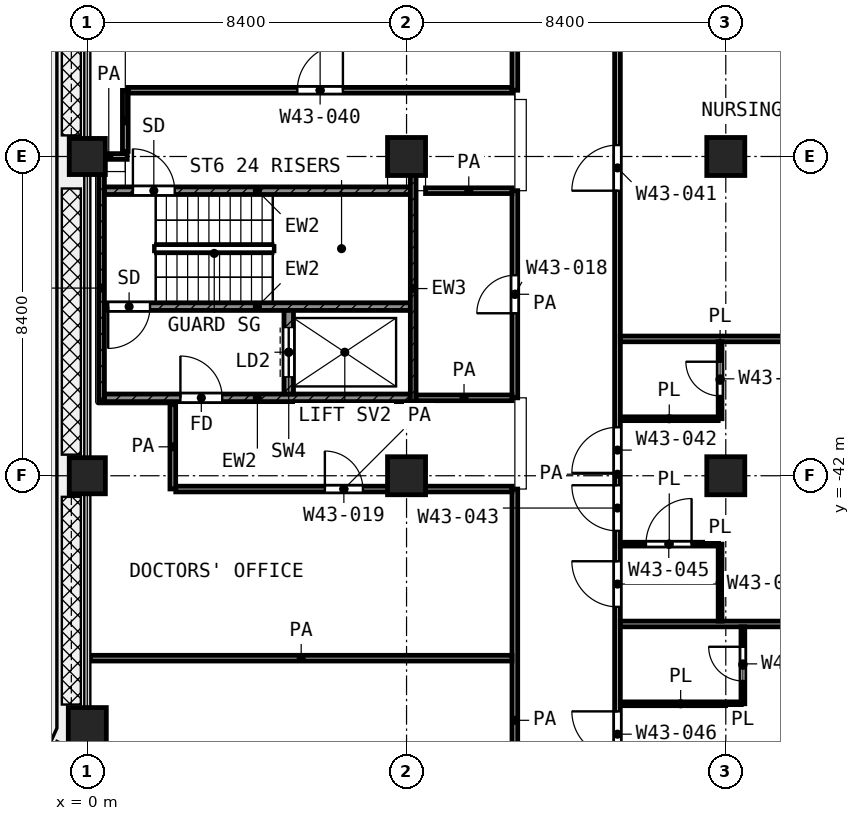
"""IFC4 building model, lengths in metres.
Left out: names, types, materials, properties, quantities, classifications, styles, units other than length and angle.
Written with IfcOpenShell. Run it as: python <this file> out.ifc"""

import sys

from ifc_helpers import new_model, si_unit, direction, frame, frame_2d, origin, origin_2d, place, context, subcontext, project, spatial, rectangle, extrude, element, fill, save


model = new_model("IFC4")
c1 = context("Model", 3, precision=1e-05, world=origin(), true_north=direction((0.0, 1.0)))
c2 = subcontext(c1, "Body", "Model", "MODEL_VIEW")
j1 = project(units=[si_unit("LENGTHUNIT", "METRE"), si_unit("PLANEANGLEUNIT", "RADIAN")], contexts=[c1])
p1 = place(None, origin())
s1 = spatial("IfcSite", under=j1, at=p1, CompositionType="ELEMENT")
p2 = place(p1, origin())
s2 = spatial("IfcBuilding", under=s1, at=p2, CompositionType="ELEMENT")
p3 = place(p2, frame((0.0, 0.0, 208.8)))
s3 = spatial("IfcBuildingStorey", under=s2, at=p3, CompositionType="ELEMENT", Elevation=208.8)
p4 = place(p3, frame((0.0, -33.6, 0.0), z_axis=(0.0, 0.0, 1.0), x_axis=(1.0, 0.0, 0.0)))
e1 = element("IfcColumn", 1, at=p4, inside=s3, PredefinedType="COLUMN", context=c2, shape_type="SweptSolid", body=[
    extrude(rectangle(XDim=0.95, YDim=0.95, at=origin_2d()), origin(), (0.0, 0.0, 1.0), 4.2),
])
for number, where, z_axis, x_axis in (
    (2, (8.4, -33.6, 0.0), (0.0, 0.0, 1.0), (1.0, 0.0, 0.0)),
    (3, (16.8, -33.6, 0.0), (0.0, 0.0, 1.0), (1.0, 0.0, 0.0)),
):
    element("IfcColumn", number, at=place(p3, frame(where, z_axis=z_axis, x_axis=x_axis)), inside=s3, PredefinedType="COLUMN", context=c2, shape_type="SweptSolid", body=[
        extrude(rectangle(XDim=1.0, YDim=1.0, at=origin_2d()), origin(), (0.0, 0.0, 1.0), 4.2),
    ])
p5 = place(p3, frame((0.0, -42.0, 0.0), z_axis=(0.0, 0.0, 1.0), x_axis=(1.0, 0.0, 0.0)))
e4 = element("IfcColumn", 4, at=p5, inside=s3, PredefinedType="COLUMN", context=c2, shape_type="SweptSolid", body=[
    extrude(rectangle(XDim=0.95, YDim=0.95, at=origin_2d()), origin(), (0.0, 0.0, 1.0), 4.2),
])
for number, where, z_axis, x_axis in (
    (5, (8.4, -42.0, 0.0), (0.0, 0.0, 1.0), (1.0, 0.0, 0.0)),
    (6, (16.8, -42.0, 0.0), (0.0, 0.0, 1.0), (1.0, 0.0, 0.0)),
    (7, (0.0, -48.6, 0.0), (0.0, 0.0, 1.0), (1.0, 0.0, 0.0)),
):
    element("IfcColumn", number, at=place(p3, frame(where, z_axis=z_axis, x_axis=x_axis)), inside=s3, PredefinedType="COLUMN", context=c2, shape_type="SweptSolid", body=[
        extrude(rectangle(XDim=1.0, YDim=1.0, at=origin_2d()), origin(), (0.0, 0.0, 1.0), 4.2),
    ])
p6 = place(p3, frame((0.375, -40.05, 0.0), z_axis=(0.0, 0.0, 1.0), x_axis=(0.0, 1.0, 0.0)))
e8 = element("IfcWall", 8, at=p6, inside=s3, PredefinedType="SHEAR", context=c2, shape_type="SweptSolid", body=[
    extrude(rectangle(XDim=5.975, YDim=0.15, at=frame_2d((2.988, 0.0))), origin(), (0.0, 0.0, 1.0), 3.7),
])
p7 = place(p3, frame((8.575, -40.05, 0.0), z_axis=(0.0, 0.0, 1.0), x_axis=(0.0, 1.0, 0.0)))
e9 = element("IfcWall", 9, at=p7, inside=s3, PredefinedType="SHEAR", context=c2, shape_type="SweptSolid", body=[
    extrude(rectangle(XDim=5.95, YDim=0.15, at=frame_2d((2.975, 0.0))), origin(), (0.0, 0.0, 1.0), 3.7),
])
p8 = place(p3, frame((0.45, -34.5, 0.0), z_axis=(0.0, 0.0, 1.0), x_axis=(1.0, 0.0, 0.0)))
e10 = element("IfcWall", 10, at=p8, inside=s3, PredefinedType="SHEAR", context=c2, shape_type="SweptSolid", body=[
    extrude(rectangle(XDim=8.05, YDim=0.2, at=frame_2d((4.025, 0.0))), origin(), (0.0, 0.0, 1.0), 3.7),
])
p9 = place(p8, frame((0.75, 0.0, 0.0)))
e11 = element("IfcOpeningElement", 11, at=p9, cuts=e10, PredefinedType="OPENING", context=c2, shape_type="SweptSolid", body=[
    extrude(rectangle(XDim=1.1, YDim=2.1, at=frame_2d((0.55, 1.05))), frame((0.0, 0.11, 0.0), z_axis=(0.0, -1.0, 0.0), x_axis=(1.0, 0.0, 0.0)), (0.0, 0.0, 1.0), 0.22),
])
p10 = place(p3, frame((0.45, -37.55, 0.0), z_axis=(0.0, 0.0, 1.0), x_axis=(1.0, 0.0, 0.0)))
e12 = element("IfcWall", 12, at=p10, inside=s3, PredefinedType="SHEAR", context=c2, shape_type="SweptSolid", body=[
    extrude(rectangle(XDim=8.05, YDim=0.2, at=frame_2d((4.025, 0.0))), origin(), (0.0, 0.0, 1.0), 3.7),
])
p11 = place(p10, frame((0.1, 0.0, 0.0)))
e13 = element("IfcOpeningElement", 13, at=p11, cuts=e12, PredefinedType="OPENING", context=c2, shape_type="SweptSolid", body=[
    extrude(rectangle(XDim=1.1, YDim=2.1, at=frame_2d((0.55, 1.05))), frame((0.0, 0.11, 0.0), z_axis=(0.0, -1.0, 0.0), x_axis=(1.0, 0.0, 0.0)), (0.0, 0.0, 1.0), 0.22),
])
p12 = place(p3, frame((0.45, -39.95, 0.0), z_axis=(0.0, 0.0, 1.0), x_axis=(1.0, 0.0, 0.0)))
e14 = element("IfcWall", 14, at=p12, inside=s3, PredefinedType="SHEAR", context=c2, shape_type="SweptSolid", body=[
    extrude(rectangle(XDim=8.05, YDim=0.2, at=frame_2d((4.025, 0.0))), origin(), (0.0, 0.0, 1.0), 3.7),
])
p13 = place(p12, frame((2.0, 0.0, 0.0)))
e15 = element("IfcOpeningElement", 15, at=p13, cuts=e14, PredefinedType="OPENING", context=c2, shape_type="SweptSolid", body=[
    extrude(rectangle(XDim=1.1, YDim=2.1, at=frame_2d((0.55, 1.05))), frame((0.0, 0.11, 0.0), z_axis=(0.0, -1.0, 0.0), x_axis=(1.0, 0.0, 0.0)), (0.0, 0.0, 1.0), 0.22),
])
p14 = place(p3, frame((5.3, -39.85, 0.0), z_axis=(0.0, 0.0, 1.0), x_axis=(0.0, 1.0, 0.0)))
e16 = element("IfcWall", 16, at=p14, inside=s3, PredefinedType="SHEAR", context=c2, shape_type="SweptSolid", body=[
    extrude(rectangle(XDim=2.2, YDim=0.25, at=frame_2d((1.1, 0.0))), origin(), (0.0, 0.0, 1.0), 3.7),
])
p15 = place(p14, frame((0.45, 0.0, 0.0)))
e17 = element("IfcOpeningElement", 17, at=p15, cuts=e16, PredefinedType="OPENING", context=c2, shape_type="SweptSolid", body=[
    extrude(rectangle(XDim=1.3, YDim=2.1, at=frame_2d((0.65, 1.05))), frame((0.0, 0.135, 0.0), z_axis=(0.0, -1.0, 0.0), x_axis=(1.0, 0.0, 0.0)), (0.0, 0.0, 1.0), 0.27),
])
p16 = place(p3, frame((14.025, -48.0, 0.0), z_axis=(0.0, 0.0, 1.0), x_axis=(1.0, 0.0, 0.0)))
e18 = element("IfcWall", 18, at=p16, inside=s3, PredefinedType="PARTITIONING", context=c2, shape_type="SweptSolid", body=[
    extrude(rectangle(XDim=3.175, YDim=0.1, at=frame_2d((1.587, 0.0))), origin(), (0.0, 0.0, 1.0), 3.7),
])
p17 = place(p3, frame((14.025, -43.8, 0.0), z_axis=(0.0, 0.0, 1.0), x_axis=(1.0, 0.0, 0.0)))
e19 = element("IfcWall", 19, at=p17, inside=s3, PredefinedType="PARTITIONING", context=c2, shape_type="SweptSolid", body=[
    extrude(rectangle(XDim=2.575, YDim=0.1, at=frame_2d((1.288, 0.0))), origin(), (0.0, 0.0, 1.0), 3.7),
])
p18 = place(p17, frame((0.675, 0.0, 0.0)))
e20 = element("IfcOpeningElement", 20, at=p18, cuts=e19, PredefinedType="OPENING", context=c2, shape_type="SweptSolid", body=[
    extrude(rectangle(XDim=1.2, YDim=2.1, at=frame_2d((0.6, 1.05))), frame((0.0, 0.06, 0.0), z_axis=(0.0, -1.0, 0.0), x_axis=(1.0, 0.0, 0.0)), (0.0, 0.0, 1.0), 0.12),
])
p19 = place(p3, frame((14.025, -40.5, 0.0), z_axis=(0.0, 0.0, 1.0), x_axis=(1.0, 0.0, 0.0)))
e21 = element("IfcWall", 21, at=p19, inside=s3, PredefinedType="PARTITIONING", context=c2, shape_type="SweptSolid", body=[
    extrude(rectangle(XDim=2.575, YDim=0.1, at=frame_2d((1.288, 0.0))), origin(), (0.0, 0.0, 1.0), 3.7),
])
p20 = place(p3, frame((16.65, -45.825, 0.0), z_axis=(0.0, 0.0, 1.0), x_axis=(0.0, 1.0, 0.0)))
e22 = element("IfcWall", 22, at=p20, inside=s3, PredefinedType="PARTITIONING", context=c2, shape_type="SweptSolid", body=[
    extrude(rectangle(XDim=2.025, YDim=0.1, at=frame_2d((1.012, 0.0))), origin(), (0.0, 0.0, 1.0), 3.7),
])
p21 = place(p3, frame((16.65, -40.5, 0.0), z_axis=(0.0, 0.0, 1.0), x_axis=(0.0, 1.0, 0.0)))
e23 = element("IfcWall", 23, at=p21, inside=s3, PredefinedType="PARTITIONING", context=c2, shape_type="SweptSolid", body=[
    extrude(rectangle(XDim=2.025, YDim=0.1, at=frame_2d((1.012, 0.0))), origin(), (0.0, 0.0, 1.0), 3.7),
])
p22 = place(p21, frame((0.6, 0.0, 0.0)))
e24 = element("IfcOpeningElement", 24, at=p22, cuts=e23, PredefinedType="OPENING", context=c2, shape_type="SweptSolid", body=[
    extrude(rectangle(XDim=0.9, YDim=2.1, at=frame_2d((0.45, 1.05))), frame((0.0, 0.06, 0.0), z_axis=(0.0, -1.0, 0.0), x_axis=(1.0, 0.0, 0.0)), (0.0, 0.0, 1.0), 0.12),
])
p23 = place(p3, frame((17.25, -48.0, 0.0), z_axis=(0.0, 0.0, 1.0), x_axis=(0.0, 1.0, 0.0)))
e25 = element("IfcWall", 25, at=p23, inside=s3, PredefinedType="PARTITIONING", context=c2, shape_type="SweptSolid", body=[
    extrude(rectangle(XDim=2.025, YDim=0.1, at=frame_2d((1.012, 0.0))), origin(), (0.0, 0.0, 1.0), 3.7),
])
p24 = place(p23, frame((0.6, 0.0, 0.0)))
e26 = element("IfcOpeningElement", 26, at=p24, cuts=e25, PredefinedType="OPENING", context=c2, shape_type="SweptSolid", body=[
    extrude(rectangle(XDim=0.9, YDim=2.1, at=frame_2d((0.45, 1.05))), frame((0.0, 0.06, 0.0), z_axis=(0.0, -1.0, 0.0), x_axis=(1.0, 0.0, 0.0)), (0.0, 0.0, 1.0), 0.12),
])
p25 = place(p3, frame((0.08, -46.8, 0.0), z_axis=(0.0, 0.0, 1.0), x_axis=(1.0, 0.0, 0.0)))
e27 = element("IfcWall", 27, at=p25, inside=s3, PredefinedType="PARTITIONING", context=c2, shape_type="SweptSolid", body=[
    extrude(rectangle(XDim=11.095, YDim=0.15, at=frame_2d((5.547, 0.0))), origin(), (0.0, 0.0, 1.0), 3.7),
])
p26 = place(p3, frame((14.025, -45.9, 0.0), z_axis=(0.0, 0.0, 1.0), x_axis=(1.0, 0.0, 0.0)))
e28 = element("IfcWall", 28, at=p26, inside=s3, PredefinedType="PARTITIONING", context=c2, shape_type="SweptSolid", body=[
    extrude(rectangle(XDim=11.095, YDim=0.15, at=frame_2d((5.548, 0.0))), origin(), (0.0, 0.0, 1.0), 3.7),
])
p27 = place(p3, frame((2.327, -42.35, 0.0), z_axis=(0.0, 0.0, 1.0), x_axis=(1.0, 0.0, 0.0)))
e29 = element("IfcWall", 29, at=p27, inside=s3, PredefinedType="PARTITIONING", context=c2, shape_type="SweptSolid", body=[
    extrude(rectangle(XDim=8.848, YDim=0.15, at=frame_2d((4.424, 0.0))), origin(), (0.0, 0.0, 1.0), 3.7),
])
p28 = place(p27, frame((3.924, 0.0, 0.0)))
e30 = element("IfcOpeningElement", 30, at=p28, cuts=e29, PredefinedType="OPENING", context=c2, shape_type="SweptSolid", body=[
    extrude(rectangle(XDim=1.0, YDim=2.1, at=frame_2d((0.5, 1.05))), frame((0.0, 0.085, 0.0), z_axis=(0.0, -1.0, 0.0), x_axis=(1.0, 0.0, 0.0)), (0.0, 0.0, 1.0), 0.17),
])
p29 = place(p3, frame((8.65, -39.95, 0.0), z_axis=(0.0, 0.0, 1.0), x_axis=(1.0, 0.0, 0.0)))
e31 = element("IfcWall", 31, at=p29, inside=s3, PredefinedType="PARTITIONING", context=c2, shape_type="SweptSolid", body=[
    extrude(rectangle(XDim=2.525, YDim=0.15, at=frame_2d((1.263, 0.0))), origin(), (0.0, 0.0, 1.0), 3.7),
])
p30 = place(p3, frame((14.025, -38.4, 0.0), z_axis=(0.0, 0.0, 1.0), x_axis=(1.0, 0.0, 0.0)))
e32 = element("IfcWall", 32, at=p30, inside=s3, PredefinedType="PARTITIONING", context=c2, shape_type="SweptSolid", body=[
    extrude(rectangle(XDim=11.095, YDim=0.15, at=frame_2d((5.548, 0.0))), origin(), (0.0, 0.0, 1.0), 3.7),
])
p31 = place(p3, frame((8.9, -34.5, 0.0), z_axis=(0.0, 0.0, 1.0), x_axis=(1.0, 0.0, 0.0)))
e33 = element("IfcWall", 33, at=p31, inside=s3, PredefinedType="PARTITIONING", context=c2, shape_type="SweptSolid", body=[
    extrude(rectangle(XDim=2.275, YDim=0.15, at=frame_2d((1.138, 0.0))), origin(), (0.0, 0.0, 1.0), 3.7),
])
p32 = place(p3, frame((0.08, -33.6, 0.0), z_axis=(0.0, 0.0, 1.0), x_axis=(1.0, 0.0, 0.0)))
e34 = element("IfcWall", 34, at=p32, inside=s3, PredefinedType="PARTITIONING", context=c2, shape_type="SweptSolid", body=[
    extrude(rectangle(XDim=0.97, YDim=0.15, at=frame_2d((0.485, 0.0))), origin(), (0.0, 0.0, 1.0), 3.7),
])
p33 = place(p3, frame((1.077, -31.857, 0.0), z_axis=(0.0, 0.0, 1.0), x_axis=(1.0, 0.0, 0.0)))
e35 = element("IfcWall", 35, at=p33, inside=s3, PredefinedType="PARTITIONING", context=c2, shape_type="SweptSolid", body=[
    extrude(rectangle(XDim=10.098, YDim=0.15, at=frame_2d((5.049, 0.0))), origin(), (0.0, 0.0, 1.0), 3.7),
])
p34 = place(p33, frame((4.449, 0.0, 0.0)))
e36 = element("IfcOpeningElement", 36, at=p34, cuts=e35, PredefinedType="OPENING", context=c2, shape_type="SweptSolid", body=[
    extrude(rectangle(XDim=1.2, YDim=2.1, at=frame_2d((0.6, 1.05))), frame((0.0, 0.085, 0.0), z_axis=(0.0, -1.0, 0.0), x_axis=(1.0, 0.0, 0.0)), (0.0, 0.0, 1.0), 0.17),
])
p35 = place(p3, frame((1.0, -33.465, 0.0), z_axis=(0.0, 0.0, 1.0), x_axis=(0.0, 1.0, 0.0)))
e37 = element("IfcWall", 37, at=p35, inside=s3, PredefinedType="PARTITIONING", context=c2, shape_type="SweptSolid", body=[
    extrude(rectangle(XDim=1.605, YDim=0.15, at=frame_2d((0.802, 0.0))), origin(), (0.0, 0.0, 1.0), 3.7),
])
p36 = place(p3, frame((2.25, -42.348, 0.0), z_axis=(0.0, 0.0, 1.0), x_axis=(0.0, 1.0, 0.0)))
e38 = element("IfcWall", 38, at=p36, inside=s3, PredefinedType="PARTITIONING", context=c2, shape_type="SweptSolid", body=[
    extrude(rectangle(XDim=2.218, YDim=0.15, at=frame_2d((1.109, 0.0))), origin(), (0.0, 0.0, 1.0), 3.7),
])
p37 = place(p3, frame((11.25, -54.52, 0.0), z_axis=(0.0, 0.0, 1.0), x_axis=(0.0, 1.0, 0.0)))
e39 = element("IfcWall", 39, at=p37, inside=s3, PredefinedType="PARTITIONING", context=c2, shape_type="SweptSolid", body=[
    extrude(rectangle(XDim=12.17, YDim=0.15, at=frame_2d((6.085, 0.0))), origin(), (0.0, 0.0, 1.0), 3.7),
])
p38 = place(p37, frame((3.07, 0.0, 0.0)))
e40 = element("IfcOpeningElement", 40, at=p38, cuts=e39, PredefinedType="OPENING", context=c2, shape_type="SweptSolid", body=[
    extrude(rectangle(XDim=1.5, YDim=2.1, at=frame_2d((0.75, 1.05))), frame((0.0, 0.085, 0.0), z_axis=(0.0, -1.0, 0.0), x_axis=(1.0, 0.0, 0.0)), (0.0, 0.0, 1.0), 0.17),
])
p39 = place(p3, frame((11.25, -39.95, 0.0), z_axis=(0.0, 0.0, 1.0), x_axis=(0.0, 1.0, 0.0)))
e41 = element("IfcWall", 41, at=p39, inside=s3, PredefinedType="PARTITIONING", context=c2, shape_type="SweptSolid", body=[
    extrude(rectangle(XDim=5.45, YDim=0.15, at=frame_2d((2.725, 0.0))), origin(), (0.0, 0.0, 1.0), 3.7),
])
p40 = place(p39, frame((2.225, 0.0, 0.0)))
e42 = element("IfcOpeningElement", 42, at=p40, cuts=e41, PredefinedType="OPENING", context=c2, shape_type="SweptSolid", body=[
    extrude(rectangle(XDim=1.0, YDim=2.1, at=frame_2d((0.5, 1.05))), frame((0.0, 0.085, 0.0), z_axis=(0.0, -1.0, 0.0), x_axis=(1.0, 0.0, 0.0)), (0.0, 0.0, 1.0), 0.17),
])
p41 = place(p3, frame((11.25, -31.857, 0.0), z_axis=(0.0, 0.0, 1.0), x_axis=(0.0, 1.0, 0.0)))
e43 = element("IfcWall", 43, at=p41, inside=s3, PredefinedType="PARTITIONING", context=c2, shape_type="SweptSolid", body=[
    extrude(rectangle(XDim=2.457, YDim=0.15, at=frame_2d((1.229, 0.0))), origin(), (0.0, 0.0, 1.0), 3.7),
])
p42 = place(p3, frame((13.95, -54.52, 0.0), z_axis=(0.0, 0.0, 1.0), x_axis=(0.0, 1.0, 0.0)))
e44 = element("IfcWall", 44, at=p42, inside=s3, PredefinedType="PARTITIONING", context=c2, shape_type="SweptSolid", body=[
    extrude(rectangle(XDim=25.12, YDim=0.15, at=frame_2d((12.56, 0.0))), origin(), (0.0, 0.0, 1.0), 3.7),
])
p43 = place(p42, frame((20.02, 0.0, 0.0)))
e45 = element("IfcOpeningElement", 45, at=p43, cuts=e44, PredefinedType="OPENING", context=c2, shape_type="SweptSolid", body=[
    extrude(rectangle(XDim=1.2, YDim=2.1, at=frame_2d((0.6, 1.05))), frame((0.0, 0.085, 0.0), z_axis=(0.0, -1.0, 0.0), x_axis=(1.0, 0.0, 0.0)), (0.0, 0.0, 1.0), 0.17),
])
p44 = place(p42, frame((12.595, 0.0, 0.0)))
e46 = element("IfcOpeningElement", 46, at=p44, cuts=e44, PredefinedType="OPENING", context=c2, shape_type="SweptSolid", body=[
    extrude(rectangle(XDim=1.2, YDim=2.1, at=frame_2d((0.6, 1.05))), frame((0.0, 0.085, 0.0), z_axis=(0.0, -1.0, 0.0), x_axis=(1.0, 0.0, 0.0)), (0.0, 0.0, 1.0), 0.17),
])
p45 = place(p42, frame((11.07, 0.0, 0.0)))
e47 = element("IfcOpeningElement", 47, at=p45, cuts=e44, PredefinedType="OPENING", context=c2, shape_type="SweptSolid", body=[
    extrude(rectangle(XDim=1.2, YDim=2.1, at=frame_2d((0.6, 1.05))), frame((0.0, 0.085, 0.0), z_axis=(0.0, -1.0, 0.0), x_axis=(1.0, 0.0, 0.0)), (0.0, 0.0, 1.0), 0.17),
])
p46 = place(p42, frame((9.07, 0.0, 0.0)))
e48 = element("IfcOpeningElement", 48, at=p46, cuts=e44, PredefinedType="OPENING", context=c2, shape_type="SweptSolid", body=[
    extrude(rectangle(XDim=1.2, YDim=2.1, at=frame_2d((0.6, 1.05))), frame((0.0, 0.085, 0.0), z_axis=(0.0, -1.0, 0.0), x_axis=(1.0, 0.0, 0.0)), (0.0, 0.0, 1.0), 0.17),
])
p47 = place(p42, frame((5.12, 0.0, 0.0)))
e49 = element("IfcOpeningElement", 49, at=p47, cuts=e44, PredefinedType="OPENING", context=c2, shape_type="SweptSolid", body=[
    extrude(rectangle(XDim=1.2, YDim=2.1, at=frame_2d((0.6, 1.05))), frame((0.0, 0.085, 0.0), z_axis=(0.0, -1.0, 0.0), x_axis=(1.0, 0.0, 0.0)), (0.0, 0.0, 1.0), 0.17),
])
p48 = place(p42, frame((1.52, 0.0, 0.0)))
e50 = element("IfcOpeningElement", 50, at=p48, cuts=e44, PredefinedType="OPENING", context=c2, shape_type="SweptSolid", body=[
    extrude(rectangle(XDim=1.0, YDim=2.1, at=frame_2d((0.5, 1.05))), frame((0.0, 0.085, 0.0), z_axis=(0.0, -1.0, 0.0), x_axis=(1.0, 0.0, 0.0)), (0.0, 0.0, 1.0), 0.17),
])
p49 = place(p9, origin())
e51 = element("IfcDoor", 51, at=p49, inside=s3, OperationType="SINGLE_SWING_LEFT", PredefinedType="DOOR", context=c2, shape_type="SweptSolid", body=[
    extrude(rectangle(XDim=1.1, YDim=2.1, at=frame_2d((0.55, 1.05))), frame((0.0, 0.025, 0.0), z_axis=(0.0, -1.0, 0.0), x_axis=(1.0, 0.0, 0.0)), (0.0, 0.0, 1.0), 0.05),
])
fill(e11, e51)
p50 = place(p11, frame((1.1, 0.0, 0.0), z_axis=(0.0, 0.0, 1.0), x_axis=(-1.0, 0.0, 0.0)))
e52 = element("IfcDoor", 52, at=p50, inside=s3, OperationType="SINGLE_SWING_LEFT", PredefinedType="DOOR", context=c2, shape_type="SweptSolid", body=[
    extrude(rectangle(XDim=1.1, YDim=2.1, at=frame_2d((0.55, 1.05))), frame((0.0, 0.025, 0.0), z_axis=(0.0, -1.0, 0.0), x_axis=(1.0, 0.0, 0.0)), (0.0, 0.0, 1.0), 0.05),
])
fill(e13, e52)
p51 = place(p15, origin())
e53 = element("IfcDoor", 53, at=p51, inside=s3, OperationType="DOUBLE_DOOR_SLIDING", PredefinedType="DOOR", context=c2, shape_type="SweptSolid", body=[
    extrude(rectangle(XDim=1.3, YDim=2.1, at=frame_2d((0.65, 1.05))), frame((0.0, 0.025, 0.0), z_axis=(0.0, -1.0, 0.0), x_axis=(1.0, 0.0, 0.0)), (0.0, 0.0, 1.0), 0.05),
])
fill(e17, e53)
p52 = place(p13, origin())
e54 = element("IfcDoor", 54, at=p52, inside=s3, OperationType="SINGLE_SWING_LEFT", PredefinedType="DOOR", context=c2, shape_type="SweptSolid", body=[
    extrude(rectangle(XDim=1.1, YDim=2.1, at=frame_2d((0.55, 1.05))), frame((0.0, 0.025, 0.0), z_axis=(0.0, -1.0, 0.0), x_axis=(1.0, 0.0, 0.0)), (0.0, 0.0, 1.0), 0.05),
])
fill(e15, e54)
p53 = place(p34, origin())
e55 = element("IfcDoor", 55, at=p53, inside=s3, OperationType="SINGLE_SWING_RIGHT", PredefinedType="DOOR", context=c2, shape_type="SweptSolid", body=[
    extrude(rectangle(XDim=1.2, YDim=2.1, at=frame_2d((0.6, 1.05))), frame((0.0, 0.025, 0.0), z_axis=(0.0, -1.0, 0.0), x_axis=(1.0, 0.0, 0.0)), (0.0, 0.0, 1.0), 0.05),
])
fill(e36, e55)
p54 = place(p40, origin())
e56 = element("IfcDoor", 56, at=p54, inside=s3, OperationType="SINGLE_SWING_LEFT", PredefinedType="DOOR", context=c2, shape_type="SweptSolid", body=[
    extrude(rectangle(XDim=1.0, YDim=2.1, at=frame_2d((0.5, 1.05))), frame((0.0, 0.025, 0.0), z_axis=(0.0, -1.0, 0.0), x_axis=(1.0, 0.0, 0.0)), (0.0, 0.0, 1.0), 0.05),
])
fill(e42, e56)
p55 = place(p28, origin())
e57 = element("IfcDoor", 57, at=p55, inside=s3, OperationType="SINGLE_SWING_LEFT", PredefinedType="DOOR", context=c2, shape_type="SweptSolid", body=[
    extrude(rectangle(XDim=1.0, YDim=2.1, at=frame_2d((0.5, 1.05))), frame((0.0, 0.025, 0.0), z_axis=(0.0, -1.0, 0.0), x_axis=(1.0, 0.0, 0.0)), (0.0, 0.0, 1.0), 0.05),
])
fill(e30, e57)
p56 = place(p43, origin())
e58 = element("IfcDoor", 58, at=p56, inside=s3, OperationType="SINGLE_SWING_LEFT", PredefinedType="DOOR", context=c2, shape_type="SweptSolid", body=[
    extrude(rectangle(XDim=1.2, YDim=2.1, at=frame_2d((0.6, 1.05))), frame((0.0, 0.025, 0.0), z_axis=(0.0, -1.0, 0.0), x_axis=(1.0, 0.0, 0.0)), (0.0, 0.0, 1.0), 0.05),
])
fill(e45, e58)
p57 = place(p44, origin())
e59 = element("IfcDoor", 59, at=p57, inside=s3, OperationType="SINGLE_SWING_LEFT", PredefinedType="DOOR", context=c2, shape_type="SweptSolid", body=[
    extrude(rectangle(XDim=1.2, YDim=2.1, at=frame_2d((0.6, 1.05))), frame((0.0, 0.025, 0.0), z_axis=(0.0, -1.0, 0.0), x_axis=(1.0, 0.0, 0.0)), (0.0, 0.0, 1.0), 0.05),
])
fill(e46, e59)
p58 = place(p45, origin())
e60 = element("IfcDoor", 60, at=p58, inside=s3, OperationType="SINGLE_SWING_RIGHT", PredefinedType="DOOR", context=c2, shape_type="SweptSolid", body=[
    extrude(rectangle(XDim=1.2, YDim=2.1, at=frame_2d((0.6, 1.05))), frame((0.0, 0.025, 0.0), z_axis=(0.0, -1.0, 0.0), x_axis=(1.0, 0.0, 0.0)), (0.0, 0.0, 1.0), 0.05),
])
fill(e47, e60)
p59 = place(p46, origin())
e61 = element("IfcDoor", 61, at=p59, inside=s3, OperationType="SINGLE_SWING_RIGHT", PredefinedType="DOOR", context=c2, shape_type="SweptSolid", body=[
    extrude(rectangle(XDim=1.2, YDim=2.1, at=frame_2d((0.6, 1.05))), frame((0.0, 0.025, 0.0), z_axis=(0.0, -1.0, 0.0), x_axis=(1.0, 0.0, 0.0)), (0.0, 0.0, 1.0), 0.05),
])
fill(e48, e61)
p60 = place(p18, origin())
e62 = element("IfcDoor", 62, at=p60, inside=s3, OperationType="SINGLE_SWING_RIGHT", PredefinedType="DOOR", context=c2, shape_type="SweptSolid", body=[
    extrude(rectangle(XDim=1.2, YDim=2.1, at=frame_2d((0.6, 1.05))), frame((0.0, 0.025, 0.0), z_axis=(0.0, -1.0, 0.0), x_axis=(1.0, 0.0, 0.0)), (0.0, 0.0, 1.0), 0.05),
])
fill(e20, e62)
p61 = place(p22, origin())
e63 = element("IfcDoor", 63, at=p61, inside=s3, OperationType="SINGLE_SWING_RIGHT", PredefinedType="DOOR", context=c2, shape_type="SweptSolid", body=[
    extrude(rectangle(XDim=0.9, YDim=2.1, at=frame_2d((0.45, 1.05))), frame((0.0, 0.025, 0.0), z_axis=(0.0, -1.0, 0.0), x_axis=(1.0, 0.0, 0.0)), (0.0, 0.0, 1.0), 0.05),
])
fill(e24, e63)
p62 = place(p47, origin())
e64 = element("IfcDoor", 64, at=p62, inside=s3, OperationType="SINGLE_SWING_RIGHT", PredefinedType="DOOR", context=c2, shape_type="SweptSolid", body=[
    extrude(rectangle(XDim=1.2, YDim=2.1, at=frame_2d((0.6, 1.05))), frame((0.0, 0.025, 0.0), z_axis=(0.0, -1.0, 0.0), x_axis=(1.0, 0.0, 0.0)), (0.0, 0.0, 1.0), 0.05),
])
fill(e49, e64)
p63 = place(p24, origin())
e65 = element("IfcDoor", 65, at=p63, inside=s3, OperationType="SINGLE_SWING_RIGHT", PredefinedType="DOOR", context=c2, shape_type="SweptSolid", body=[
    extrude(rectangle(XDim=0.9, YDim=2.1, at=frame_2d((0.45, 1.05))), frame((0.0, 0.025, 0.0), z_axis=(0.0, -1.0, 0.0), x_axis=(1.0, 0.0, 0.0)), (0.0, 0.0, 1.0), 0.05),
])
fill(e26, e65)
save(model, sys.argv[1])
